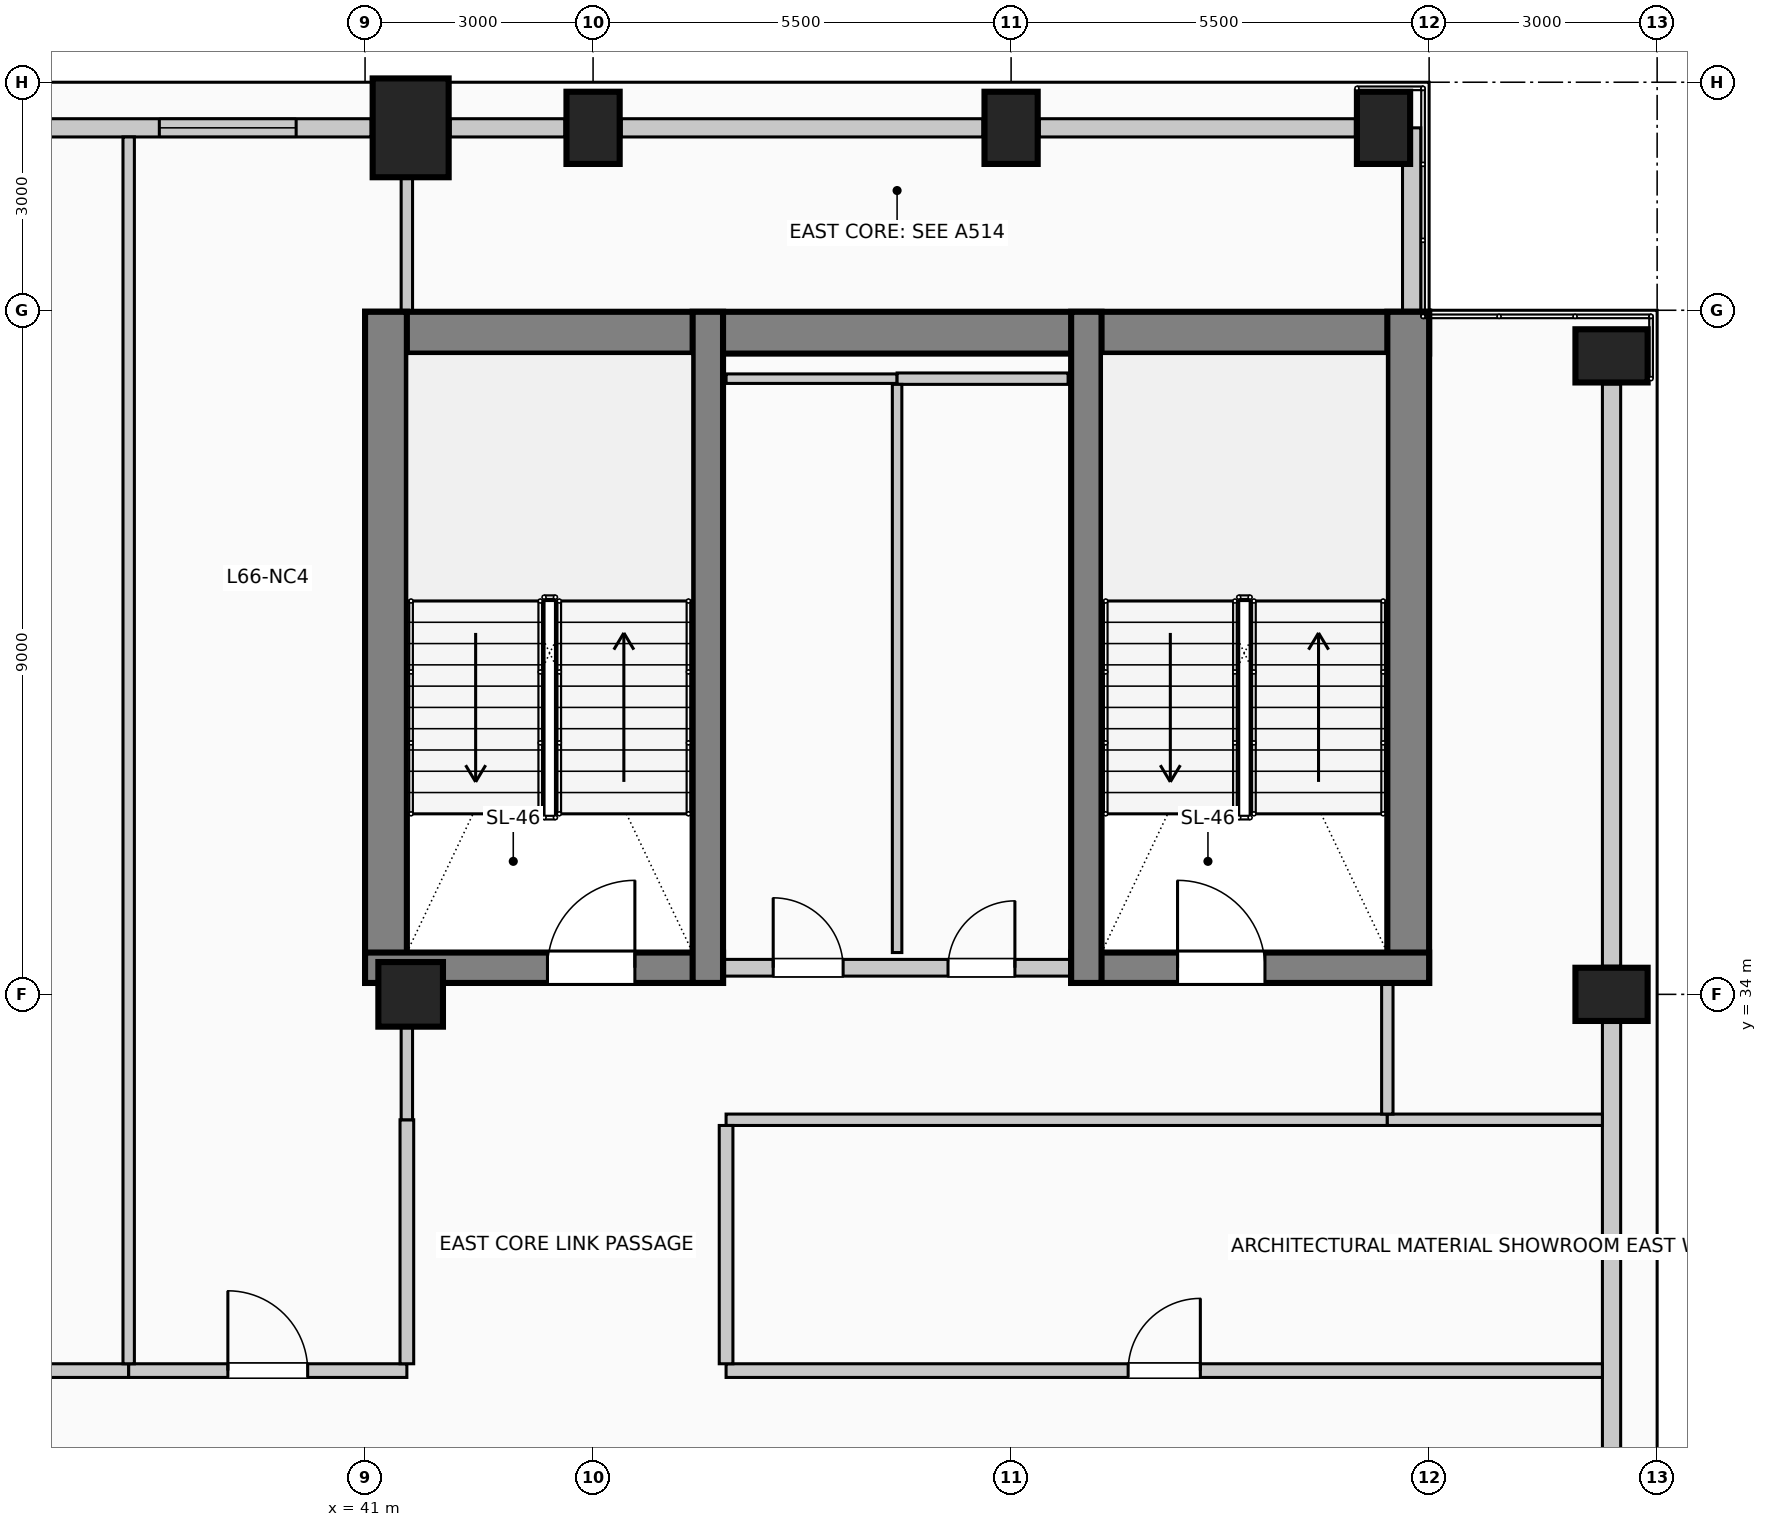
"""IFC4 building model, lengths in metres.
Left out: names, types, materials, properties, quantities, classifications, styles, units other than length and angle.
Written with IfcOpenShell. Run it as: python <this file> out.ifc"""

import sys

from ifc_helpers import new_model, si_unit, direction, frame, frame_2d, origin, origin_2d, place, context, subcontext, project, spatial, rectangle, circle, extrude, element, fill, save


model = new_model("IFC4")
c1 = context("Model", 3, precision=1e-05, world=origin(), true_north=direction((0.0, 1.0)))
c2 = subcontext(c1, "Body", "Model", "MODEL_VIEW")
j1 = project(units=[si_unit("LENGTHUNIT", "METRE"), si_unit("PLANEANGLEUNIT", "RADIAN")], contexts=[c1])
p1 = place(None, origin())
s1 = spatial("IfcSite", under=j1, at=p1, CompositionType="ELEMENT")
p2 = place(p1, origin())
s2 = spatial("IfcBuilding", under=s1, at=p2, CompositionType="ELEMENT")
p3 = place(p2, frame((0.0, 0.0, 272.6)))
s3 = spatial("IfcBuildingStorey", under=s2, at=p3, CompositionType="ELEMENT", Elevation=272.6)
p4 = place(p3, frame((41.0, 42.705, 0.0), z_axis=(0.0, 0.0, 1.0), x_axis=(1.0, 0.0, 0.0)))
e1 = element("IfcWall", 1, at=p4, inside=s3, PredefinedType="SHEAR", context=c2, shape_type="SweptSolid", body=[
    extrude(rectangle(XDim=14.0, YDim=0.55, at=frame_2d((7.0, 0.0))), origin(), (0.0, 0.0, 1.0), 4.0),
])
for number, where, z_axis, x_axis in (
    (2, (41.275, 34.15, 0.0), (0.0, 0.0, 1.0), (0.0, 1.0, 0.0)),
    (3, (54.725, 34.15, 0.0), (0.0, 0.0, 1.0), (0.0, 1.0, 0.0)),
):
    element("IfcWall", number, at=place(p3, frame(where, z_axis=z_axis, x_axis=x_axis)), inside=s3, PredefinedType="SHEAR", context=c2, shape_type="SweptSolid", body=[
        extrude(rectangle(XDim=8.83, YDim=0.55, at=frame_2d((4.415, 0.0))), origin(), (0.0, 0.0, 1.0), 4.0),
    ])
p5 = place(p3, frame((41.0, 34.35, 0.0), z_axis=(0.0, 0.0, 1.0), x_axis=(1.0, 0.0, 0.0)))
e4 = element("IfcWall", 4, at=p5, inside=s3, PredefinedType="SHEAR", context=c2, shape_type="SweptSolid", body=[
    extrude(rectangle(XDim=4.71, YDim=0.4, at=frame_2d((2.355, 0.0))), origin(), (0.0, 0.0, 1.0), 4.0),
])
p6 = place(p5, frame((2.4, 0.0, 0.0)))
e5 = element("IfcOpeningElement", 5, at=p6, cuts=e4, PredefinedType="OPENING", context=c2, shape_type="SweptSolid", body=[
    extrude(rectangle(XDim=1.15, YDim=2.2, at=frame_2d((0.575, 1.1))), frame((0.0, 0.21, 0.0), z_axis=(0.0, -1.0, 0.0), x_axis=(1.0, 0.0, 0.0)), (0.0, 0.0, 1.0), 0.42),
])
p7 = place(p3, frame((45.51, 34.15, 0.0), z_axis=(0.0, 0.0, 1.0), x_axis=(0.0, 1.0, 0.0)))
e6 = element("IfcWall", 6, at=p7, inside=s3, PredefinedType="SHEAR", context=c2, shape_type="SweptSolid", body=[
    extrude(rectangle(XDim=8.83, YDim=0.4, at=frame_2d((4.415, 0.0))), origin(), (0.0, 0.0, 1.0), 4.0),
])
p8 = place(p3, frame((50.29, 34.35, 0.0), z_axis=(0.0, 0.0, 1.0), x_axis=(1.0, 0.0, 0.0)))
e7 = element("IfcWall", 7, at=p8, inside=s3, PredefinedType="SHEAR", context=c2, shape_type="SweptSolid", body=[
    extrude(rectangle(XDim=4.71, YDim=0.4, at=frame_2d((2.355, 0.0))), origin(), (0.0, 0.0, 1.0), 4.0),
])
p9 = place(p8, frame((1.4, 0.0, 0.0)))
e8 = element("IfcOpeningElement", 8, at=p9, cuts=e7, PredefinedType="OPENING", context=c2, shape_type="SweptSolid", body=[
    extrude(rectangle(XDim=1.15, YDim=2.2, at=frame_2d((0.575, 1.1))), frame((0.0, 0.21, 0.0), z_axis=(0.0, -1.0, 0.0), x_axis=(1.0, 0.0, 0.0)), (0.0, 0.0, 1.0), 0.42),
])
p10 = place(p3, frame((50.49, 34.15, 0.0), z_axis=(0.0, 0.0, 1.0), x_axis=(0.0, 1.0, 0.0)))
e9 = element("IfcWall", 9, at=p10, inside=s3, PredefinedType="SHEAR", context=c2, shape_type="SweptSolid", body=[
    extrude(rectangle(XDim=8.83, YDim=0.4, at=frame_2d((4.415, 0.0))), origin(), (0.0, 0.0, 1.0), 4.0),
])
p11 = place(p3, frame((41.6, 45.4, 0.0), z_axis=(0.0, 0.0, 1.0), x_axis=(1.0, 0.0, 0.0)))
e10 = element("IfcColumn", 10, at=p11, inside=s3, PredefinedType="COLUMN", context=c2, shape_type="SweptSolid", body=[
    extrude(rectangle(XDim=1.0, YDim=1.3, at=origin_2d()), origin(), (0.0, 0.0, 1.0), 4.0),
])
for number, where, z_axis, x_axis in (
    (11, (44.0, 45.4, 0.0), (0.0, 0.0, 1.0), (1.0, 0.0, 0.0)),
    (12, (49.5, 45.4, 0.0), (0.0, 0.0, 1.0), (1.0, 0.0, 0.0)),
    (13, (54.4, 45.4, 0.0), (0.0, 0.0, 1.0), (1.0, 0.0, 0.0)),
    (14, (57.4, 34.0, 0.0), (0.0, 0.0, 1.0), (0.0, 1.0, 0.0)),
    (15, (57.4, 42.4, 0.0), (0.0, 0.0, 1.0), (0.0, 1.0, 0.0)),
):
    element("IfcColumn", number, at=place(p3, frame(where, z_axis=z_axis, x_axis=x_axis)), inside=s3, PredefinedType="COLUMN", context=c2, shape_type="SweptSolid", body=[
        extrude(rectangle(XDim=0.7, YDim=0.95, at=origin_2d()), origin(), (0.0, 0.0, 1.0), 4.0),
    ])
p12 = place(p3, frame((41.6, 34.0, 0.0), z_axis=(0.0, 0.0, 1.0), x_axis=(1.0, 0.0, 0.0)))
e16 = element("IfcColumn", 16, at=p12, inside=s3, PredefinedType="COLUMN", context=c2, shape_type="SweptSolid", body=[
    extrude(circle(Radius=0.425, at=origin_2d()), origin(), (0.0, 0.0, 1.0), 4.0),
])
p13 = place(p3, frame((34.52, 45.4, 0.0), z_axis=(0.0, 0.0, 1.0), x_axis=(1.0, 0.0, 0.0)))
e17 = element("IfcWall", 17, at=p13, inside=s3, PredefinedType="SOLIDWALL", context=c2, shape_type="SweptSolid", body=[
    extrude(rectangle(XDim=6.56, YDim=0.24, at=frame_2d((3.28, 0.0))), origin(), (0.0, 0.0, 1.0), 3.0),
])
p14 = place(p13, frame((3.773, 0.0, 0.42)))
e18 = element("IfcOpeningElement", 18, at=p14, cuts=e17, PredefinedType="OPENING", context=c2, shape_type="SweptSolid", body=[
    extrude(rectangle(XDim=1.8, YDim=2.2, at=frame_2d((0.9, 1.1))), frame((0.0, 0.13, 0.0), z_axis=(0.0, -1.0, 0.0), x_axis=(1.0, 0.0, 0.0)), (0.0, 0.0, 1.0), 0.26),
])
p15 = place(p3, frame((42.12, 45.4, 0.0), z_axis=(0.0, 0.0, 1.0), x_axis=(1.0, 0.0, 0.0)))
e19 = element("IfcWall", 19, at=p15, inside=s3, PredefinedType="SOLIDWALL", context=c2, shape_type="SweptSolid", body=[
    extrude(rectangle(XDim=1.51, YDim=0.24, at=frame_2d((0.755, 0.0))), origin(), (0.0, 0.0, 1.0), 3.0),
])
p16 = place(p3, frame((44.37, 45.4, 0.0), z_axis=(0.0, 0.0, 1.0), x_axis=(1.0, 0.0, 0.0)))
e20 = element("IfcWall", 20, at=p16, inside=s3, PredefinedType="SOLIDWALL", context=c2, shape_type="SweptSolid", body=[
    extrude(rectangle(XDim=4.76, YDim=0.24, at=frame_2d((2.38, 0.0))), origin(), (0.0, 0.0, 1.0), 3.0),
])
p17 = place(p3, frame((49.87, 45.4, 0.0), z_axis=(0.0, 0.0, 1.0), x_axis=(1.0, 0.0, 0.0)))
e21 = element("IfcWall", 21, at=p17, inside=s3, PredefinedType="SOLIDWALL", context=c2, shape_type="SweptSolid", body=[
    extrude(rectangle(XDim=4.16, YDim=0.24, at=frame_2d((2.08, 0.0))), origin(), (0.0, 0.0, 1.0), 3.0),
])
p18 = place(p3, frame((57.4, 33.63, 0.0), z_axis=(0.0, 0.0, 1.0), x_axis=(0.0, -1.0, 0.0)))
e22 = element("IfcWall", 22, at=p18, inside=s3, PredefinedType="SOLIDWALL", context=c2, shape_type="SweptSolid", body=[
    extrude(rectangle(XDim=7.26, YDim=0.24, at=frame_2d((3.63, 0.0))), origin(), (0.0, 0.0, 1.0), 3.0),
])
p19 = place(p3, frame((57.4, 42.03, 0.0), z_axis=(0.0, 0.0, 1.0), x_axis=(0.0, -1.0, 0.0)))
e23 = element("IfcWall", 23, at=p19, inside=s3, PredefinedType="SOLIDWALL", context=c2, shape_type="SweptSolid", body=[
    extrude(rectangle(XDim=7.66, YDim=0.24, at=frame_2d((3.83, 0.0))), origin(), (0.0, 0.0, 1.0), 3.0),
])
p20 = place(p3, frame((54.77, 45.4, 0.0), z_axis=(0.0, 0.0, 1.0), x_axis=(0.0, -1.0, 0.0)))
e24 = element("IfcWall", 24, at=p20, inside=s3, PredefinedType="SOLIDWALL", context=c2, shape_type="SweptSolid", body=[
    extrude(rectangle(XDim=2.415, YDim=0.24, at=frame_2d((1.208, 0.0))), origin(), (0.0, 0.0, 1.0), 3.75),
])
p21 = place(p3, frame((45.72, 34.35, 0.0), z_axis=(0.0, 0.0, 1.0), x_axis=(1.0, 0.0, 0.0)))
e25 = element("IfcWall", 25, at=p21, inside=s3, PredefinedType="PARTITIONING", context=c2, shape_type="SweptSolid", body=[
    extrude(rectangle(XDim=4.56, YDim=0.22, at=frame_2d((2.28, 0.0))), origin(), (0.0, 0.0, 1.0), 3.75),
])
p22 = place(p21, frame((0.65, 0.0, 0.0)))
e26 = element("IfcOpeningElement", 26, at=p22, cuts=e25, PredefinedType="OPENING", context=c2, shape_type="SweptSolid", body=[
    extrude(rectangle(XDim=0.92, YDim=2.1, at=frame_2d((0.46, 1.05))), frame((0.0, 0.12, 0.0), z_axis=(0.0, -1.0, 0.0), x_axis=(1.0, 0.0, 0.0)), (0.0, 0.0, 1.0), 0.24),
])
p23 = place(p21, frame((2.95, 0.0, 0.0)))
e27 = element("IfcOpeningElement", 27, at=p23, cuts=e25, PredefinedType="OPENING", context=c2, shape_type="SweptSolid", body=[
    extrude(rectangle(XDim=0.88, YDim=2.1, at=frame_2d((0.44, 1.05))), frame((0.0, 0.12, 0.0), z_axis=(0.0, -1.0, 0.0), x_axis=(1.0, 0.0, 0.0)), (0.0, 0.0, 1.0), 0.24),
])
p24 = place(p3, frame((32.33, 29.05, 0.0), z_axis=(0.0, 0.0, 1.0), x_axis=(1.0, 0.0, 0.0)))
e28 = element("IfcWall", 28, at=p24, inside=s3, PredefinedType="PARTITIONING", context=c2, shape_type="SweptSolid", body=[
    extrude(rectangle(XDim=5.56, YDim=0.18, at=frame_2d((2.78, 0.0))), origin(), (0.0, 0.0, 1.0), 3.75),
])
p25 = place(p24, frame((2.305, 0.0, 0.0)))
e29 = element("IfcOpeningElement", 29, at=p25, cuts=e28, PredefinedType="OPENING", context=c2, shape_type="SweptSolid", body=[
    extrude(rectangle(XDim=0.95, YDim=2.15, at=frame_2d((0.475, 1.075))), frame((0.0, 0.1, 0.0), z_axis=(0.0, -1.0, 0.0), x_axis=(1.0, 0.0, 0.0)), (0.0, 0.0, 1.0), 0.2),
])
p26 = place(p3, frame((37.89, 29.05, 0.0), z_axis=(0.0, 0.0, 1.0), x_axis=(1.0, 0.0, 0.0)))
e30 = element("IfcWall", 30, at=p26, inside=s3, PredefinedType="PARTITIONING", context=c2, shape_type="SweptSolid", body=[
    extrude(rectangle(XDim=3.66, YDim=0.18, at=frame_2d((1.83, 0.0))), origin(), (0.0, 0.0, 1.0), 3.75),
])
p27 = place(p26, frame((1.305, 0.0, 0.0)))
e31 = element("IfcOpeningElement", 31, at=p27, cuts=e30, PredefinedType="OPENING", context=c2, shape_type="SweptSolid", body=[
    extrude(rectangle(XDim=1.05, YDim=2.15, at=frame_2d((0.525, 1.075))), frame((0.0, 0.1, 0.0), z_axis=(0.0, -1.0, 0.0), x_axis=(1.0, 0.0, 0.0)), (0.0, 0.0, 1.0), 0.2),
])
p28 = place(p3, frame((45.75, 29.05, 0.0), z_axis=(0.0, 0.0, 1.0), x_axis=(1.0, 0.0, 0.0)))
e32 = element("IfcWall", 32, at=p28, inside=s3, PredefinedType="PARTITIONING", context=c2, shape_type="SweptSolid", body=[
    extrude(rectangle(XDim=11.53, YDim=0.18, at=frame_2d((5.765, 0.0))), origin(), (0.0, 0.0, 1.0), 3.75),
])
p29 = place(p28, frame((5.29, 0.0, 0.0)))
e33 = element("IfcOpeningElement", 33, at=p29, cuts=e32, PredefinedType="OPENING", context=c2, shape_type="SweptSolid", body=[
    extrude(rectangle(XDim=0.95, YDim=2.15, at=frame_2d((0.475, 1.075))), frame((0.0, 0.1, 0.0), z_axis=(0.0, -1.0, 0.0), x_axis=(1.0, 0.0, 0.0)), (0.0, 0.0, 1.0), 0.2),
])
p30 = place(p3, frame((45.75, 32.35, 0.0), z_axis=(0.0, 0.0, 1.0), x_axis=(1.0, 0.0, 0.0)))
e34 = element("IfcWall", 34, at=p30, inside=s3, PredefinedType="PARTITIONING", context=c2, shape_type="SweptSolid", body=[
    extrude(rectangle(XDim=8.7, YDim=0.15, at=frame_2d((4.35, 0.0))), origin(), (0.0, 0.0, 1.0), 3.75),
])
p31 = place(p3, frame((54.45, 32.35, 0.0), z_axis=(0.0, 0.0, 1.0), x_axis=(1.0, 0.0, 0.0)))
e35 = element("IfcWall", 35, at=p31, inside=s3, PredefinedType="PARTITIONING", context=c2, shape_type="SweptSolid", body=[
    extrude(rectangle(XDim=2.83, YDim=0.15, at=frame_2d((1.415, 0.0))), origin(), (0.0, 0.0, 1.0), 3.75),
])
p32 = place(p3, frame((45.75, 42.1, 0.0), z_axis=(0.0, 0.0, 1.0), x_axis=(1.0, 0.0, 0.0)))
e36 = element("IfcWall", 36, at=p32, inside=s3, PredefinedType="PARTITIONING", context=c2, shape_type="SweptSolid", body=[
    extrude(rectangle(XDim=2.25, YDim=0.125, at=frame_2d((1.125, 0.0))), origin(), (0.0, 0.0, 1.0), 3.75),
])
p33 = place(p3, frame((48.0, 42.1, 0.0), z_axis=(0.0, 0.0, 1.0), x_axis=(1.0, 0.0, 0.0)))
e37 = element("IfcWall", 37, at=p33, inside=s3, PredefinedType="PARTITIONING", context=c2, shape_type="SweptSolid", body=[
    extrude(rectangle(XDim=2.25, YDim=0.15, at=frame_2d((1.125, 0.0))), origin(), (0.0, 0.0, 1.0), 3.75),
])
p34 = place(p3, frame((37.89, 29.14, 0.0), z_axis=(0.0, 0.0, 1.0), x_axis=(0.0, 1.0, 0.0)))
e38 = element("IfcWall", 38, at=p34, inside=s3, PredefinedType="PARTITIONING", context=c2, shape_type="SweptSolid", body=[
    extrude(rectangle(XDim=16.14, YDim=0.15, at=frame_2d((8.07, 0.0))), origin(), (0.0, 0.0, 1.0), 3.75),
])
p35 = place(p3, frame((41.55, 29.14, 0.0), z_axis=(0.0, 0.0, 1.0), x_axis=(0.0, 1.0, 0.0)))
e39 = element("IfcWall", 39, at=p35, inside=s3, PredefinedType="PARTITIONING", context=c2, shape_type="SweptSolid", body=[
    extrude(rectangle(XDim=3.21, YDim=0.18, at=frame_2d((1.605, 0.0))), origin(), (0.0, 0.0, 1.0), 3.195),
])
p36 = place(p3, frame((41.55, 32.35, 0.0), z_axis=(0.0, 0.0, 1.0), x_axis=(0.0, 1.0, 0.0)))
e40 = element("IfcWall", 40, at=p36, inside=s3, PredefinedType="PARTITIONING", context=c2, shape_type="SweptSolid", body=[
    extrude(rectangle(XDim=1.225, YDim=0.15, at=frame_2d((0.612, 0.0))), origin(), (0.0, 0.0, 1.0), 3.195),
])
p37 = place(p3, frame((41.55, 42.98, 0.0), z_axis=(0.0, 0.0, 1.0), x_axis=(0.0, 1.0, 0.0)))
e41 = element("IfcWall", 41, at=p37, inside=s3, PredefinedType="PARTITIONING", context=c2, shape_type="SweptSolid", body=[
    extrude(rectangle(XDim=1.77, YDim=0.15, at=frame_2d((0.885, 0.0))), origin(), (0.0, 0.0, 1.0), 3.75),
])
p38 = place(p3, frame((45.75, 29.14, 0.0), z_axis=(0.0, 0.0, 1.0), x_axis=(0.0, 1.0, 0.0)))
e42 = element("IfcWall", 42, at=p38, inside=s3, PredefinedType="PARTITIONING", context=c2, shape_type="SweptSolid", body=[
    extrude(rectangle(XDim=3.135, YDim=0.18, at=frame_2d((1.567, 0.0))), origin(), (0.0, 0.0, 1.0), 3.75),
])
p39 = place(p3, frame((48.0, 34.55, 0.0), z_axis=(0.0, 0.0, 1.0), x_axis=(0.0, 1.0, 0.0)))
e43 = element("IfcWall", 43, at=p39, inside=s3, PredefinedType="PARTITIONING", context=c2, shape_type="SweptSolid", body=[
    extrude(rectangle(XDim=7.475, YDim=0.125, at=frame_2d((3.737, 0.0))), origin(), (0.0, 0.0, 1.0), 3.75),
])
p40 = place(p3, frame((54.45, 32.425, 0.0), z_axis=(0.0, 0.0, 1.0), x_axis=(0.0, 1.0, 0.0)))
e44 = element("IfcWall", 44, at=p40, inside=s3, PredefinedType="PARTITIONING", context=c2, shape_type="SweptSolid", body=[
    extrude(rectangle(XDim=1.725, YDim=0.15, at=frame_2d((0.862, 0.0))), origin(), (0.0, 0.0, 1.0), 3.75),
])
p41 = place(p14, origin())
e45 = element("IfcWindow", 45, at=p41, inside=s3, PartitioningType="SINGLE_PANEL", PredefinedType="WINDOW", context=c2, shape_type="SweptSolid", body=[
    extrude(rectangle(XDim=1.8, YDim=2.2, at=frame_2d((0.9, 1.1))), frame((0.0, 0.03, 0.0), z_axis=(0.0, -1.0, 0.0), x_axis=(1.0, 0.0, 0.0)), (0.0, 0.0, 1.0), 0.06),
])
fill(e18, e45)
p42 = place(p6, origin())
e46 = element("IfcDoor", 46, at=p42, inside=s3, OperationType="SINGLE_SWING_RIGHT", PredefinedType="DOOR", context=c2, shape_type="SweptSolid", body=[
    extrude(rectangle(XDim=1.15, YDim=2.2, at=frame_2d((0.575, 1.1))), frame((0.0, 0.025, 0.0), z_axis=(0.0, -1.0, 0.0), x_axis=(1.0, 0.0, 0.0)), (0.0, 0.0, 1.0), 0.05),
])
fill(e5, e46)
p43 = place(p22, origin())
e47 = element("IfcDoor", 47, at=p43, inside=s3, OperationType="SINGLE_SWING_LEFT", PredefinedType="DOOR", context=c2, shape_type="SweptSolid", body=[
    extrude(rectangle(XDim=0.92, YDim=2.1, at=frame_2d((0.46, 1.05))), frame((0.0, 0.025, 0.0), z_axis=(0.0, -1.0, 0.0), x_axis=(1.0, 0.0, 0.0)), (0.0, 0.0, 1.0), 0.05),
])
fill(e26, e47)
p44 = place(p23, origin())
e48 = element("IfcDoor", 48, at=p44, inside=s3, OperationType="SINGLE_SWING_RIGHT", PredefinedType="DOOR", context=c2, shape_type="SweptSolid", body=[
    extrude(rectangle(XDim=0.88, YDim=2.1, at=frame_2d((0.44, 1.05))), frame((0.0, 0.025, 0.0), z_axis=(0.0, -1.0, 0.0), x_axis=(1.0, 0.0, 0.0)), (0.0, 0.0, 1.0), 0.05),
])
fill(e27, e48)
p45 = place(p9, origin())
e49 = element("IfcDoor", 49, at=p45, inside=s3, OperationType="SINGLE_SWING_LEFT", PredefinedType="DOOR", context=c2, shape_type="SweptSolid", body=[
    extrude(rectangle(XDim=1.15, YDim=2.2, at=frame_2d((0.575, 1.1))), frame((0.0, 0.025, 0.0), z_axis=(0.0, -1.0, 0.0), x_axis=(1.0, 0.0, 0.0)), (0.0, 0.0, 1.0), 0.05),
])
fill(e8, e49)
p46 = place(p27, origin())
e50 = element("IfcDoor", 50, at=p46, inside=s3, OperationType="SINGLE_SWING_LEFT", PredefinedType="DOOR", context=c2, shape_type="SweptSolid", body=[
    extrude(rectangle(XDim=1.05, YDim=2.15, at=frame_2d((0.525, 1.075))), frame((0.0, 0.025, 0.0), z_axis=(0.0, -1.0, 0.0), x_axis=(1.0, 0.0, 0.0)), (0.0, 0.0, 1.0), 0.05),
])
fill(e31, e50)
p47 = place(p29, origin())
e51 = element("IfcDoor", 51, at=p47, inside=s3, OperationType="SINGLE_SWING_RIGHT", PredefinedType="DOOR", context=c2, shape_type="SweptSolid", body=[
    extrude(rectangle(XDim=0.95, YDim=2.15, at=frame_2d((0.475, 1.075))), frame((0.0, 0.025, 0.0), z_axis=(0.0, -1.0, 0.0), x_axis=(1.0, 0.0, 0.0)), (0.0, 0.0, 1.0), 0.05),
])
fill(e33, e51)
save(model, sys.argv[1])
